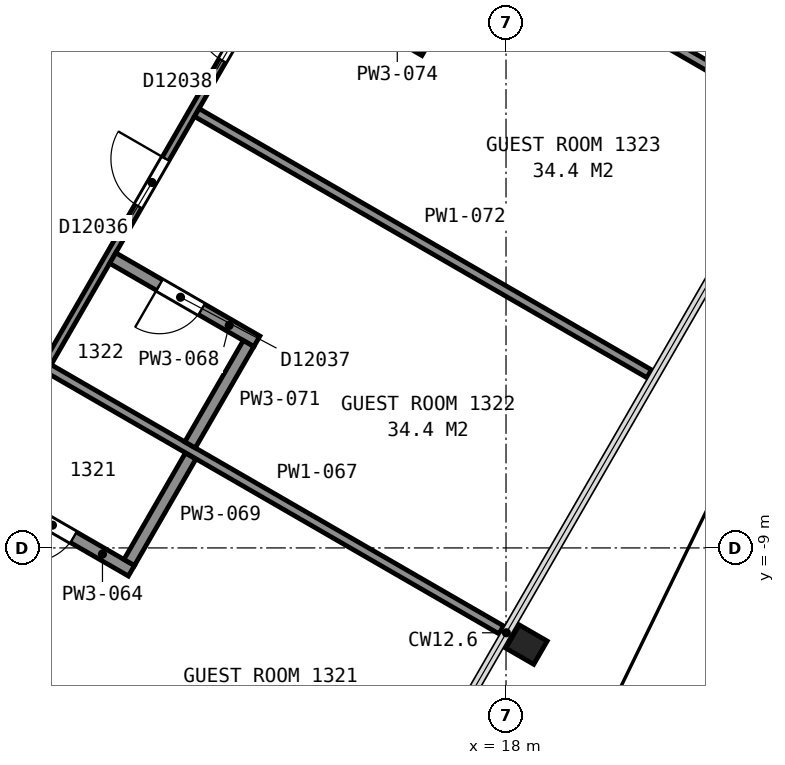
"""IFC4 building model, lengths in metres.
Left out: names, types, materials, properties, quantities, classifications, styles, units other than length and angle.
Written with IfcOpenShell. Run it as: python <this file> out.ifc"""

import sys

from ifc_helpers import new_model, si_unit, direction, frame, frame_2d, origin, origin_2d, place, context, subcontext, project, spatial, rectangle, i_section, extrude, element, fill, save


model = new_model("IFC4")
c1 = context("Model", 3, precision=1e-05, world=origin(), true_north=direction((0.0, 1.0)))
c2 = subcontext(c1, "Body", "Model", "MODEL_VIEW")
j1 = project(units=[si_unit("LENGTHUNIT", "METRE"), si_unit("PLANEANGLEUNIT", "RADIAN")], contexts=[c1])
p1 = place(None, origin())
s1 = spatial("IfcSite", under=j1, at=p1, CompositionType="ELEMENT")
p2 = place(p1, origin())
s2 = spatial("IfcBuilding", under=s1, at=p2, CompositionType="ELEMENT")
p3 = place(p2, frame((0.0, 0.0, 62.0)))
s3 = spatial("IfcBuildingStorey", under=s2, at=p3, CompositionType="ELEMENT", Elevation=62.0)
p4 = place(p3, frame((18.252, -10.541, 0.025), z_axis=(0.072028126388, -0.041530965358, 0.996537569751), x_axis=(-0.499785583529, -0.866149161394, 2.670081e-05)))
e1 = element("IfcColumn", 1, at=p4, inside=s3, PredefinedType="COLUMN", context=c2, shape_type="SweptSolid", body=[
    extrude(i_section(OverallWidth=0.442, OverallDepth=0.531, WebThickness=0.066, FlangeThickness=0.106, FilletRadius=0.015, at=origin_2d()), origin(), (0.0, 0.0, 1.0), 3.562),
])
p5 = place(p3, frame((8.492, -3.012, 0.0), z_axis=(0.0, 0.0, 1.0), x_axis=(0.499972957231, 0.866041016371, 0.0)))
e2 = element("IfcWall", 2, at=p5, inside=s3, PredefinedType="PARTITIONING", context=c2, shape_type="SweptSolid", body=[
    extrude(rectangle(XDim=10.349, YDim=0.2, at=frame_2d((5.174, 0.0))), origin(), (0.0, 0.0, 1.0), 3.35),
])
p6 = place(p3, frame((17.486, 6.206, 0.0), z_axis=(0.0, 0.0, 1.0), x_axis=(-0.499990458811, -0.866030912322, 0.0)))
e3 = element("IfcWall", 3, at=p6, inside=s3, PredefinedType="PARTITIONING", context=c2, shape_type="SweptSolid", body=[
    extrude(rectangle(XDim=27.441, YDim=0.125, at=frame_2d((13.721, 0.0))), origin(), (0.0, 0.0, 1.0), 2.613),
])
p7 = place(p6, frame((20.529, 0.0, 0.0)))
e4 = element("IfcOpeningElement", 4, at=p7, cuts=e3, PredefinedType="OPENING", context=c2, shape_type="SweptSolid", body=[
    extrude(rectangle(XDim=0.9, YDim=2.1, at=frame_2d((0.45, 1.05))), frame((0.0, 0.073, 0.0), z_axis=(0.0, -1.0, 0.0), x_axis=(1.0, 0.0, 0.0)), (0.0, 0.0, 1.0), 0.145),
])
p8 = place(p6, frame((17.516, 0.0, 0.0)))
e5 = element("IfcOpeningElement", 5, at=p8, cuts=e3, PredefinedType="OPENING", context=c2, shape_type="SweptSolid", body=[
    extrude(rectangle(XDim=0.9, YDim=2.1, at=frame_2d((0.45, 1.05))), frame((0.0, 0.073, 0.0), z_axis=(0.0, -1.0, 0.0), x_axis=(1.0, 0.0, 0.0)), (0.0, 0.0, 1.0), 0.145),
])
p9 = place(p6, frame((10.168, 0.0, 0.0)))
e6 = element("IfcOpeningElement", 6, at=p9, cuts=e3, PredefinedType="OPENING", context=c2, shape_type="SweptSolid", body=[
    extrude(rectangle(XDim=0.9, YDim=2.1, at=frame_2d((0.45, 1.05))), frame((0.0, 0.073, 0.0), z_axis=(0.0, -1.0, 0.0), x_axis=(1.0, 0.0, 0.0)), (0.0, 0.0, 1.0), 0.145),
])
p10 = place(p6, frame((7.403, 0.0, 0.0)))
e7 = element("IfcOpeningElement", 7, at=p10, cuts=e3, PredefinedType="OPENING", context=c2, shape_type="SweptSolid", body=[
    extrude(rectangle(XDim=0.9, YDim=2.1, at=frame_2d((0.45, 1.05))), frame((0.0, 0.073, 0.0), z_axis=(0.0, -1.0, 0.0), x_axis=(1.0, 0.0, 0.0)), (0.0, 0.0, 1.0), 0.145),
])
p11 = place(p6, frame((0.741, 0.0, 0.0)))
e8 = element("IfcOpeningElement", 8, at=p11, cuts=e3, PredefinedType="OPENING", context=c2, shape_type="SweptSolid", body=[
    extrude(rectangle(XDim=0.9, YDim=2.1, at=frame_2d((0.45, 1.05))), frame((0.0, 0.073, 0.0), z_axis=(0.0, -1.0, 0.0), x_axis=(1.0, 0.0, 0.0)), (0.0, 0.0, 1.0), 0.145),
])
p12 = place(p3, frame((7.733, -10.813, 0.0), z_axis=(0.0, 0.0, 1.0), x_axis=(0.866002910178, -0.500038958046, 0.0)))
e9 = element("IfcWall", 9, at=p12, inside=s3, PredefinedType="PARTITIONING", context=c2, shape_type="SweptSolid", body=[
    extrude(rectangle(XDim=8.591, YDim=0.15, at=frame_2d((4.295, 0.0))), origin(), (0.0, 0.0, 1.0), 2.613),
])
p13 = place(p3, frame((9.382, -7.957, 0.0), z_axis=(0.0, 0.0, 1.0), x_axis=(0.866048046904, -0.499960778915, 0.0)))
e10 = element("IfcWall", 10, at=p13, inside=s3, PredefinedType="PARTITIONING", context=c2, shape_type="SweptSolid", body=[
    extrude(rectangle(XDim=2.838, YDim=0.2, at=frame_2d((1.419, 0.0))), origin(), (0.0, 0.0, 1.0), 2.613),
])
p14 = place(p13, frame((0.938, 0.0, 0.0)))
e11 = element("IfcOpeningElement", 11, at=p14, cuts=e10, PredefinedType="OPENING", context=c2, shape_type="SweptSolid", body=[
    extrude(rectangle(XDim=0.8, YDim=2.1, at=frame_2d((0.4, 1.05))), frame((0.0, 0.11, 0.0), z_axis=(0.0, -1.0, 0.0), x_axis=(1.0, 0.0, 0.0)), (0.0, 0.0, 1.0), 0.22),
])
p15 = place(p3, frame((10.482, -6.051, 0.0), z_axis=(0.0, 0.0, 1.0), x_axis=(0.865978298045, -0.500081580659, 0.0)))
e12 = element("IfcWall", 12, at=p15, inside=s3, PredefinedType="PARTITIONING", context=c2, shape_type="SweptSolid", body=[
    extrude(rectangle(XDim=8.591, YDim=0.15, at=frame_2d((4.296, 0.0))), origin(), (0.0, 0.0, 1.0), 2.613),
])
p16 = place(p3, frame((13.903, -5.602, 0.0), z_axis=(0.0, 0.0, 1.0), x_axis=(-0.86596722502, 0.50010075504, 0.0)))
e13 = element("IfcWall", 13, at=p16, inside=s3, PredefinedType="PARTITIONING", context=c2, shape_type="SweptSolid", body=[
    extrude(rectangle(XDim=2.737, YDim=0.2, at=frame_2d((1.369, 0.0))), origin(), (0.0, 0.0, 1.0), 2.613),
])
p17 = place(p16, frame((1.05, 0.0, 0.0)))
e14 = element("IfcOpeningElement", 14, at=p17, cuts=e13, PredefinedType="OPENING", context=c2, shape_type="SweptSolid", body=[
    extrude(rectangle(XDim=0.8, YDim=2.1, at=frame_2d((0.4, 1.05))), frame((0.0, 0.11, 0.0), z_axis=(0.0, -1.0, 0.0), x_axis=(1.0, 0.0, 0.0)), (0.0, 0.0, 1.0), 0.22),
])
p18 = place(p3, frame((11.803, -9.24, 0.0), z_axis=(0.0, 0.0, 1.0), x_axis=(0.499816582577, 0.866131273989, 0.0)))
e15 = element("IfcWall", 15, at=p18, inside=s3, PredefinedType="PARTITIONING", context=c2, shape_type="SweptSolid", body=[
    extrude(rectangle(XDim=2.021, YDim=0.2, at=frame_2d((1.01, 0.0))), origin(), (0.0, 0.0, 1.0), 2.613),
])
p19 = place(p3, frame((12.803, -7.305, 0.0), z_axis=(0.0, 0.0, 1.0), x_axis=(0.500150762069, 0.865938343765, 0.0)))
e16 = element("IfcWall", 16, at=p19, inside=s3, PredefinedType="PARTITIONING", context=c2, shape_type="SweptSolid", body=[
    extrude(rectangle(XDim=1.924, YDim=0.2, at=frame_2d((0.962, 0.0))), origin(), (0.0, 0.0, 1.0), 2.613),
])
p20 = place(p3, frame((12.914, -1.839, 0.0), z_axis=(0.0, 0.0, 1.0), x_axis=(0.866010015463, -0.500026652407, 0.0)))
e17 = element("IfcWall", 17, at=p20, inside=s3, PredefinedType="PARTITIONING", context=c2, shape_type="SweptSolid", body=[
    extrude(rectangle(XDim=8.591, YDim=0.15, at=frame_2d((4.296, 0.0))), origin(), (0.0, 0.0, 1.0), 2.613),
])
p21 = place(p3, frame((14.295, 0.554, 0.0), z_axis=(0.0, 0.0, 1.0), x_axis=(0.866095017657, -0.499879405846, 0.0)))
e18 = element("IfcWall", 18, at=p21, inside=s3, PredefinedType="PARTITIONING", context=c2, shape_type="SweptSolid", body=[
    extrude(rectangle(XDim=2.738, YDim=0.2, at=frame_2d((1.369, 0.0))), origin(), (0.0, 0.0, 1.0), 2.613),
])
p22 = place(p21, frame((0.887, 0.0, 0.0)))
e19 = element("IfcOpeningElement", 19, at=p22, cuts=e18, PredefinedType="OPENING", context=c2, shape_type="SweptSolid", body=[
    extrude(rectangle(XDim=0.8, YDim=2.1, at=frame_2d((0.4, 1.05))), frame((0.0, 0.11, 0.0), z_axis=(0.0, -1.0, 0.0), x_axis=(1.0, 0.0, 0.0)), (0.0, 0.0, 1.0), 0.22),
])
p23 = place(p3, frame((15.349, 2.37, 0.0), z_axis=(0.0, 0.0, 1.0), x_axis=(0.866033609522, -0.499985786976, 0.0)))
e20 = element("IfcWall", 20, at=p23, inside=s3, PredefinedType="PARTITIONING", context=c2, shape_type="SweptSolid", body=[
    extrude(rectangle(XDim=8.587, YDim=0.15, at=frame_2d((4.293, 0.0))), origin(), (0.0, 0.0, 1.0), 2.613),
])
p24 = place(p9, origin())
e21 = element("IfcDoor", 21, at=p24, inside=s3, OperationType="SINGLE_SWING_LEFT", PredefinedType="DOOR", context=c2, shape_type="SweptSolid", body=[
    extrude(rectangle(XDim=0.9, YDim=2.1, at=frame_2d((0.45, 1.05))), frame((0.0, 0.025, 0.0), z_axis=(0.0, -1.0, 0.0), x_axis=(1.0, 0.0, 0.0)), (0.0, 0.0, 1.0), 0.05),
])
fill(e6, e21)
p25 = place(p10, origin())
e22 = element("IfcDoor", 22, at=p25, inside=s3, OperationType="SINGLE_SWING_LEFT", PredefinedType="DOOR", context=c2, shape_type="SweptSolid", body=[
    extrude(rectangle(XDim=0.9, YDim=2.1, at=frame_2d((0.45, 1.05))), frame((0.0, 0.025, 0.0), z_axis=(0.0, -1.0, 0.0), x_axis=(1.0, 0.0, 0.0)), (0.0, 0.0, 1.0), 0.05),
])
fill(e7, e22)
p26 = place(p14, origin())
e23 = element("IfcDoor", 23, at=p26, inside=s3, OperationType="SINGLE_SWING_LEFT", PredefinedType="DOOR", context=c2, shape_type="SweptSolid", body=[
    extrude(rectangle(XDim=0.8, YDim=2.1, at=frame_2d((0.4, 1.05))), frame((0.0, 0.025, 0.0), z_axis=(0.0, -1.0, 0.0), x_axis=(1.0, 0.0, 0.0)), (0.0, 0.0, 1.0), 0.05),
])
fill(e11, e23)
p27 = place(p17, origin())
e24 = element("IfcDoor", 24, at=p27, inside=s3, OperationType="SINGLE_SWING_RIGHT", PredefinedType="DOOR", context=c2, shape_type="SweptSolid", body=[
    extrude(rectangle(XDim=0.8, YDim=2.1, at=frame_2d((0.4, 1.05))), frame((0.0, 0.025, 0.0), z_axis=(0.0, -1.0, 0.0), x_axis=(1.0, 0.0, 0.0)), (0.0, 0.0, 1.0), 0.05),
])
fill(e14, e24)
save(model, sys.argv[1])
